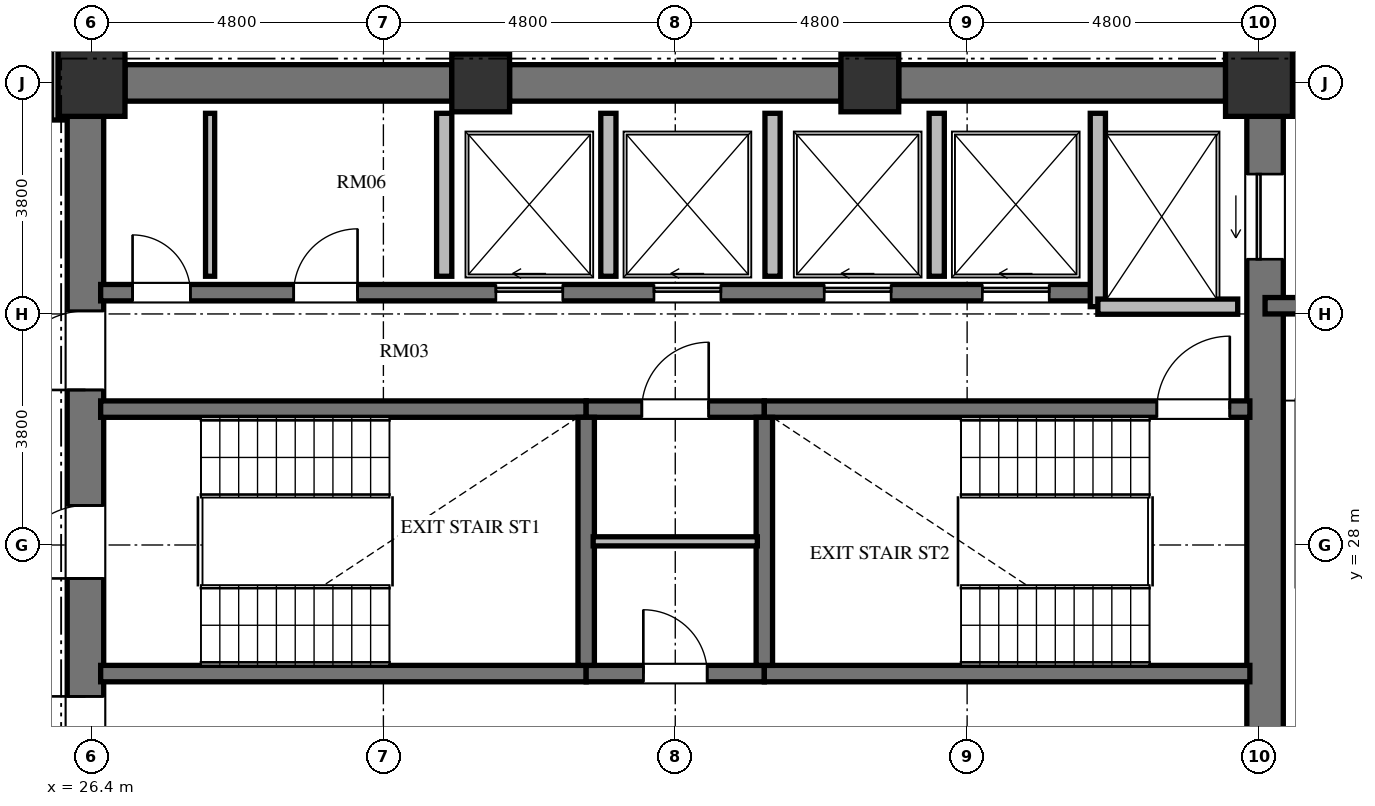
"""IFC4 building model, lengths in metres.
Left out: names, types, materials, properties, quantities, classifications, styles, units other than length and angle.
Written with IfcOpenShell. Run it as: python <this file> out.ifc"""

import sys

from ifc_helpers import new_model, si_unit, direction, frame, frame_2d, origin, origin_2d, place, context, subcontext, project, spatial, rectangle, extrude, element, fill, save


model = new_model("IFC4")
c1 = context("Model", 3, precision=1e-05, world=origin(), true_north=direction((0.0, 1.0)))
c2 = subcontext(c1, "Body", "Model", "MODEL_VIEW")
j1 = project(units=[si_unit("LENGTHUNIT", "METRE"), si_unit("PLANEANGLEUNIT", "RADIAN")], contexts=[c1])
p1 = place(None, origin())
s1 = spatial("IfcSite", under=j1, at=p1, CompositionType="ELEMENT")
p2 = place(p1, origin())
s2 = spatial("IfcBuilding", under=s1, at=p2, CompositionType="ELEMENT")
p3 = place(p2, frame((0.0, 0.0, 152.88)))
s3 = spatial("IfcBuildingStorey", under=s2, at=p3, CompositionType="ELEMENT", Elevation=152.88)
p4 = place(p3, frame((45.6, 35.6, 0.0), z_axis=(0.0, 0.0, 1.0), x_axis=(1.0, 0.0, 0.0)))
e1 = element("IfcColumn", 1, at=p4, inside=s3, PredefinedType="COLUMN", context=c2, shape_type="SweptSolid", body=[
    extrude(rectangle(XDim=1.1, YDim=1.1, at=origin_2d()), origin(), (0.0, 0.0, 1.0), 3.648),
])
for number, where, z_axis, x_axis in (
    (2, (39.2, 35.6, 0.0), (0.0, 0.0, 1.0), (1.0, 0.0, 0.0)),
    (3, (32.8, 35.6, 0.0), (0.0, 0.0, 1.0), (1.0, 0.0, 0.0)),
):
    element("IfcColumn", number, at=place(p3, frame(where, z_axis=z_axis, x_axis=x_axis)), inside=s3, PredefinedType="COLUMN", context=c2, shape_type="SweptSolid", body=[
        extrude(rectangle(XDim=0.95, YDim=0.95, at=origin_2d()), origin(), (0.0, 0.0, 1.0), 3.648),
    ])
p5 = place(p3, frame((26.4, 35.6, 0.0), z_axis=(0.0, 0.0, 1.0), x_axis=(1.0, 0.0, 0.0)))
e4 = element("IfcColumn", 4, at=p5, inside=s3, PredefinedType="COLUMN", context=c2, shape_type="SweptSolid", body=[
    extrude(rectangle(XDim=1.1, YDim=1.1, at=origin_2d()), origin(), (0.0, 0.0, 1.0), 3.648),
])
p6 = place(p3, frame((26.3, 20.95, 0.0), z_axis=(0.0, 0.0, 1.0), x_axis=(0.0, 1.0, 0.0)))
e5 = element("IfcWall", 5, at=p6, inside=s3, PredefinedType="SHEAR", context=c2, shape_type="SweptSolid", body=[
    extrude(rectangle(XDim=14.1, YDim=0.6, at=frame_2d((7.05, 0.0))), origin(), (0.0, 0.0, 1.0), 3.648),
])
p7 = place(p6, frame((6.5, 0.0, 0.0)))
e6 = element("IfcOpeningElement", 6, at=p7, cuts=e5, PredefinedType="OPENING", context=c2, shape_type="SweptSolid", body=[
    extrude(rectangle(XDim=1.2, YDim=2.15, at=frame_2d((0.6, 1.075))), frame((0.0, 0.31, 0.0), z_axis=(0.0, -1.0, 0.0), x_axis=(1.0, 0.0, 0.0)), (0.0, 0.0, 1.0), 0.62),
])
p8 = place(p6, frame((9.6, 0.0, 0.0)))
e7 = element("IfcOpeningElement", 7, at=p8, cuts=e5, PredefinedType="OPENING", context=c2, shape_type="SweptSolid", body=[
    extrude(rectangle(XDim=1.3, YDim=2.2, at=frame_2d((0.65, 1.1))), frame((0.0, 0.31, 0.0), z_axis=(0.0, -1.0, 0.0), x_axis=(1.0, 0.0, 0.0)), (0.0, 0.0, 1.0), 0.62),
])
p9 = place(p6, frame((3.26, 0.0, 0.0)))
e8 = element("IfcOpeningElement", 8, at=p9, cuts=e5, PredefinedType="OPENING", context=c2, shape_type="SweptSolid", body=[
    extrude(rectangle(XDim=1.3, YDim=2.2, at=frame_2d((0.65, 1.1))), frame((0.0, 0.31, 0.0), z_axis=(0.0, -1.0, 0.0), x_axis=(1.0, 0.0, 0.0)), (0.0, 0.0, 1.0), 0.62),
])
p10 = place(p3, frame((45.7, 20.95, 0.0), z_axis=(0.0, 0.0, 1.0), x_axis=(0.0, 1.0, 0.0)))
e9 = element("IfcWall", 9, at=p10, inside=s3, PredefinedType="SHEAR", context=c2, shape_type="SweptSolid", body=[
    extrude(rectangle(XDim=14.1, YDim=0.6, at=frame_2d((7.05, 0.0))), origin(), (0.0, 0.0, 1.0), 3.648),
])
p11 = place(p10, frame((11.75, 0.0, 0.0)))
e10 = element("IfcOpeningElement", 10, at=p11, cuts=e9, PredefinedType="OPENING", context=c2, shape_type="SweptSolid", body=[
    extrude(rectangle(XDim=1.4, YDim=2.3, at=frame_2d((0.7, 1.15))), frame((0.0, 0.31, 0.0), z_axis=(0.0, -1.0, 0.0), x_axis=(1.0, 0.0, 0.0)), (0.0, 0.0, 1.0), 0.62),
])
p12 = place(p10, frame((0.95, 0.0, 0.0)))
e11 = element("IfcOpeningElement", 11, at=p12, cuts=e9, PredefinedType="OPENING", context=c2, shape_type="SweptSolid", body=[
    extrude(rectangle(XDim=1.4, YDim=2.3, at=frame_2d((0.7, 1.15))), frame((0.0, 0.31, 0.0), z_axis=(0.0, -1.0, 0.0), x_axis=(1.0, 0.0, 0.0)), (0.0, 0.0, 1.0), 0.62),
])
p13 = place(p3, frame((26.95, 35.6, 0.0), z_axis=(0.0, 0.0, 1.0), x_axis=(1.0, 0.0, 0.0)))
e12 = element("IfcWall", 12, at=p13, inside=s3, PredefinedType="SHEAR", context=c2, shape_type="SweptSolid", body=[
    extrude(rectangle(XDim=5.375, YDim=0.6, at=frame_2d((2.688, 0.0))), origin(), (0.0, 0.0, 1.0), 3.648),
])
p14 = place(p3, frame((33.275, 35.6, 0.0), z_axis=(0.0, 0.0, 1.0), x_axis=(1.0, 0.0, 0.0)))
e13 = element("IfcWall", 13, at=p14, inside=s3, PredefinedType="SHEAR", context=c2, shape_type="SweptSolid", body=[
    extrude(rectangle(XDim=5.45, YDim=0.6, at=frame_2d((2.725, 0.0))), origin(), (0.0, 0.0, 1.0), 3.648),
])
p15 = place(p3, frame((39.675, 35.6, 0.0), z_axis=(0.0, 0.0, 1.0), x_axis=(1.0, 0.0, 0.0)))
e14 = element("IfcWall", 14, at=p15, inside=s3, PredefinedType="SHEAR", context=c2, shape_type="SweptSolid", body=[
    extrude(rectangle(XDim=5.375, YDim=0.6, at=frame_2d((2.688, 0.0))), origin(), (0.0, 0.0, 1.0), 3.648),
])
p16 = place(p3, frame((26.55, 30.235, 0.0), z_axis=(0.0, 0.0, 1.0), x_axis=(1.0, 0.0, 0.0)))
e15 = element("IfcWall", 15, at=p16, inside=s3, PredefinedType="SHEAR", context=c2, shape_type="SweptSolid", body=[
    extrude(rectangle(XDim=7.985, YDim=0.27, at=frame_2d((3.992, 0.0))), origin(), (0.0, 0.0, 1.0), 3.648),
])
p17 = place(p3, frame((34.535, 30.235, 0.0), z_axis=(0.0, 0.0, 1.0), x_axis=(1.0, 0.0, 0.0)))
e16 = element("IfcWall", 16, at=p17, inside=s3, PredefinedType="SHEAR", context=c2, shape_type="SweptSolid", body=[
    extrude(rectangle(XDim=2.93, YDim=0.27, at=frame_2d((1.465, 0.0))), origin(), (0.0, 0.0, 1.0), 3.648),
])
p18 = place(p17, frame((0.915, 0.0, 0.0)))
e17 = element("IfcOpeningElement", 17, at=p18, cuts=e16, PredefinedType="OPENING", context=c2, shape_type="SweptSolid", body=[
    extrude(rectangle(XDim=1.1, YDim=2.15, at=frame_2d((0.55, 1.075))), frame((0.0, 0.145, 0.0), z_axis=(0.0, -1.0, 0.0), x_axis=(1.0, 0.0, 0.0)), (0.0, 0.0, 1.0), 0.29),
])
p19 = place(p3, frame((37.465, 30.235, 0.0), z_axis=(0.0, 0.0, 1.0), x_axis=(1.0, 0.0, 0.0)))
e18 = element("IfcWall", 18, at=p19, inside=s3, PredefinedType="SHEAR", context=c2, shape_type="SweptSolid", body=[
    extrude(rectangle(XDim=7.985, YDim=0.27, at=frame_2d((3.992, 0.0))), origin(), (0.0, 0.0, 1.0), 3.648),
])
p20 = place(p19, frame((6.455, 0.0, 0.0)))
e19 = element("IfcOpeningElement", 19, at=p20, cuts=e18, PredefinedType="OPENING", context=c2, shape_type="SweptSolid", body=[
    extrude(rectangle(XDim=1.2, YDim=2.15, at=frame_2d((0.6, 1.075))), frame((0.0, 0.145, 0.0), z_axis=(0.0, -1.0, 0.0), x_axis=(1.0, 0.0, 0.0)), (0.0, 0.0, 1.0), 0.29),
])
p21 = place(p3, frame((26.55, 25.885, 0.0), z_axis=(0.0, 0.0, 1.0), x_axis=(1.0, 0.0, 0.0)))
e20 = element("IfcWall", 20, at=p21, inside=s3, PredefinedType="SHEAR", context=c2, shape_type="SweptSolid", body=[
    extrude(rectangle(XDim=7.985, YDim=0.27, at=frame_2d((3.992, 0.0))), origin(), (0.0, 0.0, 1.0), 3.648),
])
p22 = place(p3, frame((34.535, 25.885, 0.0), z_axis=(0.0, 0.0, 1.0), x_axis=(1.0, 0.0, 0.0)))
e21 = element("IfcWall", 21, at=p22, inside=s3, PredefinedType="SHEAR", context=c2, shape_type="SweptSolid", body=[
    extrude(rectangle(XDim=2.93, YDim=0.27, at=frame_2d((1.465, 0.0))), origin(), (0.0, 0.0, 1.0), 3.648),
])
p23 = place(p22, frame((0.94, 0.0, 0.0)))
e22 = element("IfcOpeningElement", 22, at=p23, cuts=e21, PredefinedType="OPENING", context=c2, shape_type="SweptSolid", body=[
    extrude(rectangle(XDim=1.05, YDim=2.15, at=frame_2d((0.525, 1.075))), frame((0.0, 0.145, 0.0), z_axis=(0.0, -1.0, 0.0), x_axis=(1.0, 0.0, 0.0)), (0.0, 0.0, 1.0), 0.29),
])
p24 = place(p3, frame((37.465, 25.885, 0.0), z_axis=(0.0, 0.0, 1.0), x_axis=(1.0, 0.0, 0.0)))
e23 = element("IfcWall", 23, at=p24, inside=s3, PredefinedType="SHEAR", context=c2, shape_type="SweptSolid", body=[
    extrude(rectangle(XDim=7.985, YDim=0.27, at=frame_2d((3.992, 0.0))), origin(), (0.0, 0.0, 1.0), 3.648),
])
for number, where, z_axis, x_axis in (
    (24, (34.535, 26.02, 0.0), (0.0, 0.0, 1.0), (0.0, 1.0, 0.0)),
    (25, (37.465, 26.02, 0.0), (0.0, 0.0, 1.0), (0.0, 1.0, 0.0)),
):
    element("IfcWall", number, at=place(p3, frame(where, z_axis=z_axis, x_axis=x_axis)), inside=s3, PredefinedType="SHEAR", context=c2, shape_type="SweptSolid", body=[
        extrude(rectangle(XDim=4.08, YDim=0.27, at=frame_2d((2.04, 0.0))), origin(), (0.0, 0.0, 1.0), 3.648),
    ])
p25 = place(p3, frame((34.65, 28.06, 0.0), z_axis=(0.0, 0.0, 1.0), x_axis=(1.0, 0.0, 0.0)))
e26 = element("IfcWall", 26, at=p25, inside=s3, PredefinedType="PARTITIONING", context=c2, shape_type="SweptSolid", body=[
    extrude(rectangle(XDim=2.7, YDim=0.15, at=frame_2d((1.35, 0.0))), origin(), (0.0, 0.0, 1.0), 3.428),
])
p26 = place(p3, frame((26.55, 32.15, 0.0), z_axis=(0.0, 0.0, 1.0), x_axis=(1.0, 0.0, 0.0)))
e27 = element("IfcWall", 27, at=p26, inside=s3, PredefinedType="SHEAR", context=c2, shape_type="SweptSolid", body=[
    extrude(rectangle(XDim=16.4, YDim=0.27, at=frame_2d((8.2, 0.0))), origin(), (0.0, 0.0, 1.0), 3.648),
])
p27 = place(p26, frame((0.525, 0.0, 0.0)))
e28 = element("IfcOpeningElement", 28, at=p27, cuts=e27, PredefinedType="OPENING", context=c2, shape_type="SweptSolid", body=[
    extrude(rectangle(XDim=0.95, YDim=2.1, at=frame_2d((0.475, 1.05))), frame((0.0, 0.145, 0.0), z_axis=(0.0, -1.0, 0.0), x_axis=(1.0, 0.0, 0.0)), (0.0, 0.0, 1.0), 0.29),
])
p28 = place(p26, frame((3.175, 0.0, 0.0)))
e29 = element("IfcOpeningElement", 29, at=p28, cuts=e27, PredefinedType="OPENING", context=c2, shape_type="SweptSolid", body=[
    extrude(rectangle(XDim=1.05, YDim=2.15, at=frame_2d((0.525, 1.075))), frame((0.0, 0.145, 0.0), z_axis=(0.0, -1.0, 0.0), x_axis=(1.0, 0.0, 0.0)), (0.0, 0.0, 1.0), 0.29),
])
p29 = place(p26, frame((6.5, 0.0, 0.0)))
e30 = element("IfcOpeningElement", 30, at=p29, cuts=e27, PredefinedType="OPENING", context=c2, shape_type="SweptSolid", body=[
    extrude(rectangle(XDim=1.1, YDim=2.2, at=frame_2d((0.55, 1.1))), frame((0.0, 0.145, 0.0), z_axis=(0.0, -1.0, 0.0), x_axis=(1.0, 0.0, 0.0)), (0.0, 0.0, 1.0), 0.29),
])
p30 = place(p26, frame((9.1, 0.0, 0.0)))
e31 = element("IfcOpeningElement", 31, at=p30, cuts=e27, PredefinedType="OPENING", context=c2, shape_type="SweptSolid", body=[
    extrude(rectangle(XDim=1.1, YDim=2.2, at=frame_2d((0.55, 1.1))), frame((0.0, 0.145, 0.0), z_axis=(0.0, -1.0, 0.0), x_axis=(1.0, 0.0, 0.0)), (0.0, 0.0, 1.0), 0.29),
])
p31 = place(p26, frame((11.9, 0.0, 0.0)))
e32 = element("IfcOpeningElement", 32, at=p31, cuts=e27, PredefinedType="OPENING", context=c2, shape_type="SweptSolid", body=[
    extrude(rectangle(XDim=1.1, YDim=2.2, at=frame_2d((0.55, 1.1))), frame((0.0, 0.145, 0.0), z_axis=(0.0, -1.0, 0.0), x_axis=(1.0, 0.0, 0.0)), (0.0, 0.0, 1.0), 0.29),
])
p32 = place(p26, frame((14.5, 0.0, 0.0)))
e33 = element("IfcOpeningElement", 33, at=p32, cuts=e27, PredefinedType="OPENING", context=c2, shape_type="SweptSolid", body=[
    extrude(rectangle(XDim=1.1, YDim=2.2, at=frame_2d((0.55, 1.1))), frame((0.0, 0.145, 0.0), z_axis=(0.0, -1.0, 0.0), x_axis=(1.0, 0.0, 0.0)), (0.0, 0.0, 1.0), 0.29),
])
p33 = place(p3, frame((42.95, 31.92, 0.0), z_axis=(0.0, 0.0, 1.0), x_axis=(0.0, 1.0, 0.0)))
e34 = element("IfcWall", 34, at=p33, inside=s3, PredefinedType="SOLIDWALL", context=c2, shape_type="SweptSolid", body=[
    extrude(rectangle(XDim=3.18, YDim=0.25, at=frame_2d((1.59, 0.0))), origin(), (0.0, 0.0, 1.0), 3.428),
])
p34 = place(p3, frame((42.95, 31.92, 0.0), z_axis=(0.0, 0.0, 1.0), x_axis=(1.0, 0.0, 0.0)))
e35 = element("IfcWall", 35, at=p34, inside=s3, PredefinedType="SOLIDWALL", context=c2, shape_type="SweptSolid", body=[
    extrude(rectangle(XDim=2.3, YDim=0.25, at=frame_2d((1.15, 0.0))), origin(), (0.0, 0.0, 1.0), 3.428),
])
for number, where, z_axis, x_axis in (
    (36, (32.2, 32.42, 0.0), (0.0, 0.0, 1.0), (0.0, 1.0, 0.0)),
    (37, (34.9, 32.42, 0.0), (0.0, 0.0, 1.0), (0.0, 1.0, 0.0)),
    (38, (37.6, 32.42, 0.0), (0.0, 0.0, 1.0), (0.0, 1.0, 0.0)),
    (39, (40.3, 32.42, 0.0), (0.0, 0.0, 1.0), (0.0, 1.0, 0.0)),
):
    element("IfcWall", number, at=place(p3, frame(where, z_axis=z_axis, x_axis=x_axis)), inside=s3, PredefinedType="SOLIDWALL", context=c2, shape_type="SweptSolid", body=[
        extrude(rectangle(XDim=2.68, YDim=0.25, at=frame_2d((1.34, 0.0))), origin(), (0.0, 0.0, 1.0), 3.428),
    ])
p35 = place(p3, frame((28.35, 32.42, 0.0), z_axis=(0.0, 0.0, 1.0), x_axis=(0.0, 1.0, 0.0)))
e40 = element("IfcWall", 40, at=p35, inside=s3, PredefinedType="PARTITIONING", context=c2, shape_type="SweptSolid", body=[
    extrude(rectangle(XDim=2.68, YDim=0.15, at=frame_2d((1.34, 0.0))), origin(), (0.0, 0.0, 1.0), 3.428),
])
p36 = place(p3, frame((46.0, 35.98, 0.0), z_axis=(0.0, 0.0, 1.0), x_axis=(1.0, 0.0, 0.0)))
e41 = element("IfcWall", 41, at=p36, inside=s3, PredefinedType="SHEAR", context=c2, shape_type="SweptSolid", body=[
    extrude(rectangle(XDim=4.55, YDim=0.27, at=frame_2d((2.275, 0.0))), origin(), (0.0, 0.0, 1.0), 3.648),
])
p37 = place(p3, frame((45.7, 31.935, 0.0), z_axis=(0.0, 0.0, 1.0), x_axis=(1.0, 0.0, 0.0)))
e42 = element("IfcWall", 42, at=p37, inside=s3, PredefinedType="SHEAR", context=c2, shape_type="SweptSolid", body=[
    extrude(rectangle(XDim=4.715, YDim=0.27, at=frame_2d((2.357, 0.0))), origin(), (0.0, 0.0, 1.0), 3.648),
])
p38 = place(p3, frame((25.83, 36.21, 0.0), z_axis=(0.0, 0.0, 1.0), x_axis=(0.0, -1.0, 0.0)))
e43 = element("IfcWall", 43, at=p38, inside=s3, PredefinedType="PARTITIONING", context=c2, shape_type="SweptSolid", body=[
    extrude(rectangle(XDim=1.22, YDim=0.18, at=frame_2d((0.61, 0.0))), origin(), (0.0, 0.0, 1.0), 3.428),
])
p39 = place(p7, origin())
e44 = element("IfcDoor", 44, at=p39, inside=s3, OperationType="SINGLE_SWING_LEFT", PredefinedType="DOOR", context=c2, shape_type="SweptSolid", body=[
    extrude(rectangle(XDim=1.2, YDim=2.15, at=frame_2d((0.6, 1.075))), frame((0.0, 0.025, 0.0), z_axis=(0.0, -1.0, 0.0), x_axis=(1.0, 0.0, 0.0)), (0.0, 0.0, 1.0), 0.05),
])
fill(e6, e44)
p40 = place(p20, origin())
e45 = element("IfcDoor", 45, at=p40, inside=s3, OperationType="SINGLE_SWING_RIGHT", PredefinedType="DOOR", context=c2, shape_type="SweptSolid", body=[
    extrude(rectangle(XDim=1.2, YDim=2.15, at=frame_2d((0.6, 1.075))), frame((0.0, 0.025, 0.0), z_axis=(0.0, -1.0, 0.0), x_axis=(1.0, 0.0, 0.0)), (0.0, 0.0, 1.0), 0.05),
])
fill(e19, e45)
p41 = place(p23, origin())
e46 = element("IfcDoor", 46, at=p41, inside=s3, OperationType="SINGLE_SWING_LEFT", PredefinedType="DOOR", context=c2, shape_type="SweptSolid", body=[
    extrude(rectangle(XDim=1.05, YDim=2.15, at=frame_2d((0.525, 1.075))), frame((0.0, 0.025, 0.0), z_axis=(0.0, -1.0, 0.0), x_axis=(1.0, 0.0, 0.0)), (0.0, 0.0, 1.0), 0.05),
])
fill(e22, e46)
p42 = place(p18, origin())
e47 = element("IfcDoor", 47, at=p42, inside=s3, OperationType="SINGLE_SWING_RIGHT", PredefinedType="DOOR", context=c2, shape_type="SweptSolid", body=[
    extrude(rectangle(XDim=1.1, YDim=2.15, at=frame_2d((0.55, 1.075))), frame((0.0, 0.025, 0.0), z_axis=(0.0, -1.0, 0.0), x_axis=(1.0, 0.0, 0.0)), (0.0, 0.0, 1.0), 0.05),
])
fill(e17, e47)
p43 = place(p8, origin())
e48 = element("IfcDoor", 48, at=p43, inside=s3, OperationType="SINGLE_SWING_LEFT", PredefinedType="DOOR", context=c2, shape_type="SweptSolid", body=[
    extrude(rectangle(XDim=1.3, YDim=2.2, at=frame_2d((0.65, 1.1))), frame((0.0, 0.025, 0.0), z_axis=(0.0, -1.0, 0.0), x_axis=(1.0, 0.0, 0.0)), (0.0, 0.0, 1.0), 0.05),
])
fill(e7, e48)
p44 = place(p9, origin())
e49 = element("IfcDoor", 49, at=p44, inside=s3, OperationType="SINGLE_SWING_RIGHT", PredefinedType="DOOR", context=c2, shape_type="SweptSolid", body=[
    extrude(rectangle(XDim=1.3, YDim=2.2, at=frame_2d((0.65, 1.1))), frame((0.0, 0.025, 0.0), z_axis=(0.0, -1.0, 0.0), x_axis=(1.0, 0.0, 0.0)), (0.0, 0.0, 1.0), 0.05),
])
fill(e8, e49)
p45 = place(p27, origin())
e50 = element("IfcDoor", 50, at=p45, inside=s3, OperationType="SINGLE_SWING_LEFT", PredefinedType="DOOR", context=c2, shape_type="SweptSolid", body=[
    extrude(rectangle(XDim=0.95, YDim=2.1, at=frame_2d((0.475, 1.05))), frame((0.0, 0.025, 0.0), z_axis=(0.0, -1.0, 0.0), x_axis=(1.0, 0.0, 0.0)), (0.0, 0.0, 1.0), 0.05),
])
fill(e28, e50)
p46 = place(p28, origin())
e51 = element("IfcDoor", 51, at=p46, inside=s3, OperationType="SINGLE_SWING_RIGHT", PredefinedType="DOOR", context=c2, shape_type="SweptSolid", body=[
    extrude(rectangle(XDim=1.05, YDim=2.15, at=frame_2d((0.525, 1.075))), frame((0.0, 0.025, 0.0), z_axis=(0.0, -1.0, 0.0), x_axis=(1.0, 0.0, 0.0)), (0.0, 0.0, 1.0), 0.05),
])
fill(e29, e51)
p47 = place(p29, origin())
e52 = element("IfcDoor", 52, at=p47, inside=s3, OperationType="SLIDING_TO_LEFT", PredefinedType="DOOR", context=c2, shape_type="SweptSolid", body=[
    extrude(rectangle(XDim=1.1, YDim=2.2, at=frame_2d((0.55, 1.1))), frame((0.0, 0.025, 0.0), z_axis=(0.0, -1.0, 0.0), x_axis=(1.0, 0.0, 0.0)), (0.0, 0.0, 1.0), 0.05),
])
fill(e30, e52)
p48 = place(p30, origin())
e53 = element("IfcDoor", 53, at=p48, inside=s3, OperationType="SLIDING_TO_LEFT", PredefinedType="DOOR", context=c2, shape_type="SweptSolid", body=[
    extrude(rectangle(XDim=1.1, YDim=2.2, at=frame_2d((0.55, 1.1))), frame((0.0, 0.025, 0.0), z_axis=(0.0, -1.0, 0.0), x_axis=(1.0, 0.0, 0.0)), (0.0, 0.0, 1.0), 0.05),
])
fill(e31, e53)
p49 = place(p31, origin())
e54 = element("IfcDoor", 54, at=p49, inside=s3, OperationType="SLIDING_TO_LEFT", PredefinedType="DOOR", context=c2, shape_type="SweptSolid", body=[
    extrude(rectangle(XDim=1.1, YDim=2.2, at=frame_2d((0.55, 1.1))), frame((0.0, 0.025, 0.0), z_axis=(0.0, -1.0, 0.0), x_axis=(1.0, 0.0, 0.0)), (0.0, 0.0, 1.0), 0.05),
])
fill(e32, e54)
p50 = place(p32, origin())
e55 = element("IfcDoor", 55, at=p50, inside=s3, OperationType="SLIDING_TO_LEFT", PredefinedType="DOOR", context=c2, shape_type="SweptSolid", body=[
    extrude(rectangle(XDim=1.1, YDim=2.2, at=frame_2d((0.55, 1.1))), frame((0.0, 0.025, 0.0), z_axis=(0.0, -1.0, 0.0), x_axis=(1.0, 0.0, 0.0)), (0.0, 0.0, 1.0), 0.05),
])
fill(e33, e55)
p51 = place(p11, origin())
e56 = element("IfcDoor", 56, at=p51, inside=s3, OperationType="SLIDING_TO_LEFT", PredefinedType="DOOR", context=c2, shape_type="SweptSolid", body=[
    extrude(rectangle(XDim=1.4, YDim=2.3, at=frame_2d((0.7, 1.15))), frame((0.0, 0.025, 0.0), z_axis=(0.0, -1.0, 0.0), x_axis=(1.0, 0.0, 0.0)), (0.0, 0.0, 1.0), 0.05),
])
fill(e10, e56)
save(model, sys.argv[1])
